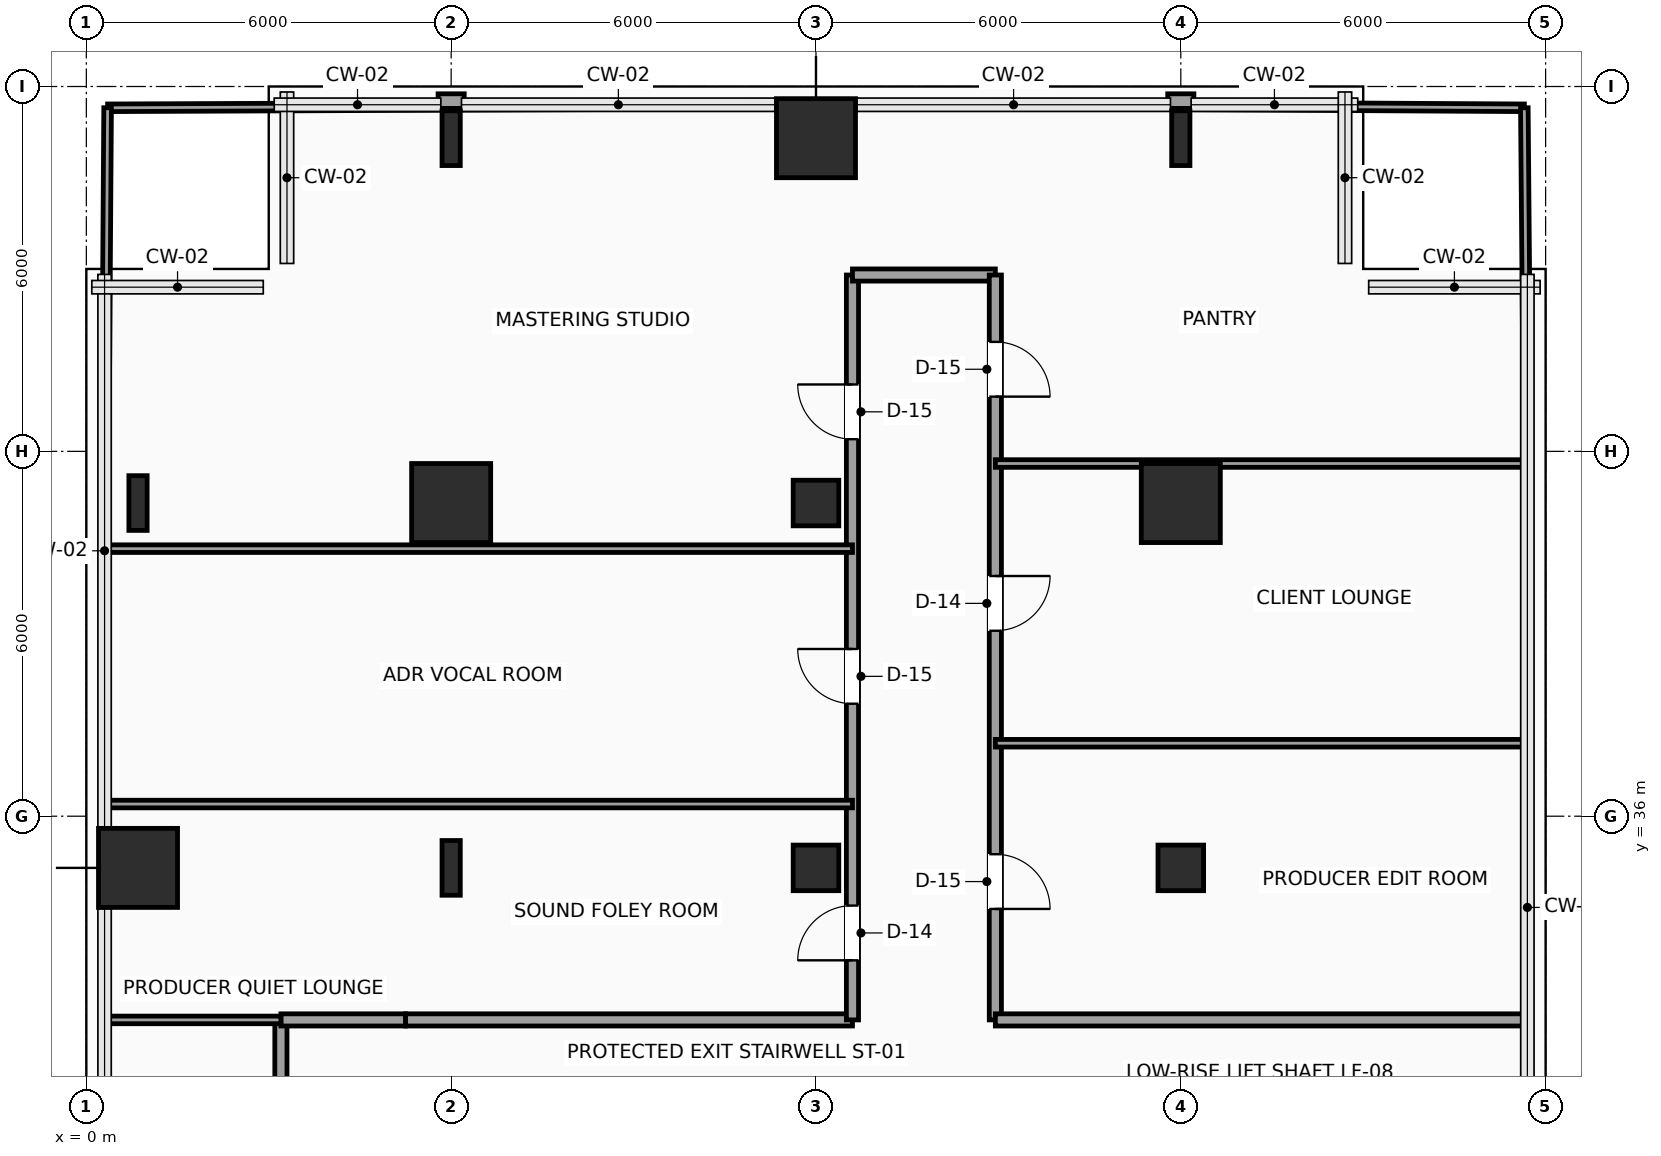
"""IFC4 building model, lengths in metres.
Left out: names, types, materials, properties, quantities, classifications, styles, units other than length and angle.
Written with IfcOpenShell. Run it as: python <this file> out.ifc"""

import sys

from ifc_helpers import new_model, si_unit, direction, frame, frame_2d, origin, origin_2d, place, context, subcontext, project, spatial, rectangle, hollow_rectangle, i_section, extrude, element, fill, save


model = new_model("IFC4")
c1 = context("Model", 3, precision=1e-05, world=origin(), true_north=direction((0.0, 1.0)))
c2 = subcontext(c1, "Body", "Model", "MODEL_VIEW")
j1 = project(units=[si_unit("LENGTHUNIT", "METRE"), si_unit("PLANEANGLEUNIT", "RADIAN")], contexts=[c1])
p1 = place(None, origin())
s1 = spatial("IfcSite", under=j1, at=p1, CompositionType="ELEMENT")
p2 = place(p1, origin())
s2 = spatial("IfcBuilding", under=s1, at=p2, CompositionType="ELEMENT")
p3 = place(p2, frame((0.0, 0.0, 51.9)))
s3 = spatial("IfcBuildingStorey", under=s2, at=p3, CompositionType="ELEMENT", Elevation=51.9)
p4 = place(p3, frame((0.85, 35.15, 0.0), z_axis=(0.0, 0.0, 1.0), x_axis=(1.0, 0.0, 0.0)))
e1 = element("IfcColumn", 1, at=p4, inside=s3, PredefinedType="COLUMN", context=c2, shape_type="SweptSolid", body=[
    extrude(rectangle(XDim=1.3, YDim=1.3, at=origin_2d()), origin(), (0.0, 0.0, 1.0), 3.9),
])
for number, where, z_axis, x_axis in (
    (2, (0.85, 41.15, 0.0), (0.0, 0.0, 1.0), (1.0, 0.0, 0.0)),
    (3, (6.0, 35.15, 0.0), (0.0, 0.0, 1.0), (1.0, 0.0, 0.0)),
):
    element("IfcColumn", number, at=place(p3, frame(where, z_axis=z_axis, x_axis=x_axis)), inside=s3, PredefinedType="COLUMN", context=c2, shape_type="SweptSolid", body=[
        extrude(i_section(OverallWidth=0.3, OverallDepth=0.9, WebThickness=0.019, FlangeThickness=0.035, FilletRadius=0.03, at=origin_2d()), origin(), (0.0, 0.0, 1.0), 3.9),
    ])
p5 = place(p3, frame((6.0, 41.15, 0.0), z_axis=(0.0, 0.0, 1.0), x_axis=(1.0, 0.0, 0.0)))
e4 = element("IfcColumn", 4, at=p5, inside=s3, PredefinedType="COLUMN", context=c2, shape_type="SweptSolid", body=[
    extrude(rectangle(XDim=1.3, YDim=1.3, at=origin_2d()), origin(), (0.0, 0.0, 1.0), 3.9),
])
p6 = place(p3, frame((6.0, 47.15, 0.0), z_axis=(0.0, 0.0, 1.0), x_axis=(1.0, 0.0, 0.0)))
e5 = element("IfcColumn", 5, at=p6, inside=s3, PredefinedType="COLUMN", context=c2, shape_type="SweptSolid", body=[
    extrude(i_section(OverallWidth=0.3, OverallDepth=0.9, WebThickness=0.019, FlangeThickness=0.035, FilletRadius=0.03, at=origin_2d()), origin(), (0.0, 0.0, 1.0), 3.9),
])
for number, where, z_axis, x_axis in (
    (6, (12.0, 35.15, 0.0), (0.0, 0.0, 1.0), (1.0, 0.0, 0.0)),
    (7, (12.0, 41.15, 0.0), (0.0, 0.0, 1.0), (1.0, 0.0, 0.0)),
):
    element("IfcColumn", number, at=place(p3, frame(where, z_axis=z_axis, x_axis=x_axis)), inside=s3, PredefinedType="COLUMN", context=c2, shape_type="SweptSolid", body=[
        extrude(hollow_rectangle(XDim=0.75, YDim=0.75, WallThickness=0.035, InnerFilletRadius=0.035, OuterFilletRadius=0.05, at=origin_2d()), origin(), (0.0, 0.0, 1.0), 3.9),
    ])
p7 = place(p3, frame((12.0, 47.15, 0.0), z_axis=(0.0, 0.0, 1.0), x_axis=(1.0, 0.0, 0.0)))
e8 = element("IfcColumn", 8, at=p7, inside=s3, PredefinedType="COLUMN", context=c2, shape_type="SweptSolid", body=[
    extrude(rectangle(XDim=1.3, YDim=1.3, at=origin_2d()), origin(), (0.0, 0.0, 1.0), 3.9),
])
p8 = place(p3, frame((18.0, 35.15, 0.0), z_axis=(0.0, 0.0, 1.0), x_axis=(1.0, 0.0, 0.0)))
e9 = element("IfcColumn", 9, at=p8, inside=s3, PredefinedType="COLUMN", context=c2, shape_type="SweptSolid", body=[
    extrude(hollow_rectangle(XDim=0.75, YDim=0.75, WallThickness=0.035, InnerFilletRadius=0.035, OuterFilletRadius=0.05, at=origin_2d()), origin(), (0.0, 0.0, 1.0), 3.9),
])
p9 = place(p3, frame((18.0, 41.15, 0.0), z_axis=(0.0, 0.0, 1.0), x_axis=(1.0, 0.0, 0.0)))
e10 = element("IfcColumn", 10, at=p9, inside=s3, PredefinedType="COLUMN", context=c2, shape_type="SweptSolid", body=[
    extrude(rectangle(XDim=1.3, YDim=1.3, at=origin_2d()), origin(), (0.0, 0.0, 1.0), 3.9),
])
p10 = place(p3, frame((18.0, 47.15, 0.0), z_axis=(0.0, 0.0, 1.0), x_axis=(1.0, 0.0, 0.0)))
e11 = element("IfcColumn", 11, at=p10, inside=s3, PredefinedType="COLUMN", context=c2, shape_type="SweptSolid", body=[
    extrude(i_section(OverallWidth=0.3, OverallDepth=0.9, WebThickness=0.019, FlangeThickness=0.035, FilletRadius=0.03, at=origin_2d()), origin(), (0.0, 0.0, 1.0), 3.9),
])
for number, where, z_axis, x_axis in (
    (12, (5.785, 47.76, 0.0), (0.0, 0.0, 1.0), (1.0, 0.0, 0.0)),
    (13, (17.785, 47.76, 0.0), (0.0, 0.0, 1.0), (1.0, 0.0, 0.0)),
):
    element("IfcWall", number, at=place(p3, frame(where, z_axis=z_axis, x_axis=x_axis)), inside=s3, PredefinedType="SOLIDWALL", context=c2, shape_type="SweptSolid", body=[
        extrude(rectangle(XDim=0.43, YDim=0.24, at=frame_2d((0.215, 0.0))), origin(), (0.0, 0.0, 1.0), 3.65),
    ])
p11 = place(p3, frame((3.2, 30.25, 0.0), z_axis=(0.0, 0.0, 1.0), x_axis=(0.0, 1.0, 0.0)))
e14 = element("IfcWall", 14, at=p11, inside=s3, PredefinedType="PARTITIONING", context=c2, shape_type="SweptSolid", body=[
    extrude(rectangle(XDim=2.4, YDim=0.2, at=frame_2d((1.2, 0.0))), origin(), (0.0, 0.0, 1.0), 3.65),
])
p12 = place(p3, frame((3.2, 32.65, 0.0), z_axis=(0.0, 0.0, 1.0), x_axis=(1.0, 0.0, 0.0)))
e15 = element("IfcWall", 15, at=p12, inside=s3, PredefinedType="PARTITIONING", context=c2, shape_type="SweptSolid", body=[
    extrude(rectangle(XDim=2.05, YDim=0.2, at=frame_2d((1.025, 0.0))), origin(), (0.0, 0.0, 1.0), 3.65),
])
p13 = place(p3, frame((5.25, 32.65, 0.0), z_axis=(0.0, 0.0, 1.0), x_axis=(1.0, 0.0, 0.0)))
e16 = element("IfcWall", 16, at=p13, inside=s3, PredefinedType="PARTITIONING", context=c2, shape_type="SweptSolid", body=[
    extrude(rectangle(XDim=7.35, YDim=0.2, at=frame_2d((3.675, 0.0))), origin(), (0.0, 0.0, 1.0), 3.65),
])
p14 = place(p3, frame((12.6, 32.65, 0.0), z_axis=(0.0, 0.0, 1.0), x_axis=(0.0, 1.0, 0.0)))
e17 = element("IfcWall", 17, at=p14, inside=s3, PredefinedType="PARTITIONING", context=c2, shape_type="SweptSolid", body=[
    extrude(rectangle(XDim=12.25, YDim=0.2, at=frame_2d((6.125, 0.0))), origin(), (0.0, 0.0, 1.0), 3.65),
])
p15 = place(p14, frame((0.98, 0.0, 0.0)))
e18 = element("IfcOpeningElement", 18, at=p15, cuts=e17, PredefinedType="OPENING", context=c2, shape_type="SweptSolid", body=[
    extrude(rectangle(XDim=0.9, YDim=2.1, at=frame_2d((0.45, 1.05))), frame((0.0, 0.11, 0.0), z_axis=(0.0, -1.0, 0.0), x_axis=(1.0, 0.0, 0.0)), (0.0, 0.0, 1.0), 0.22),
])
p16 = place(p14, frame((5.2, 0.0, 0.0)))
e19 = element("IfcOpeningElement", 19, at=p16, cuts=e17, PredefinedType="OPENING", context=c2, shape_type="SweptSolid", body=[
    extrude(rectangle(XDim=0.9, YDim=2.1, at=frame_2d((0.45, 1.05))), frame((0.0, 0.11, 0.0), z_axis=(0.0, -1.0, 0.0), x_axis=(1.0, 0.0, 0.0)), (0.0, 0.0, 1.0), 0.22),
])
p17 = place(p14, frame((9.55, 0.0, 0.0)))
e20 = element("IfcOpeningElement", 20, at=p17, cuts=e17, PredefinedType="OPENING", context=c2, shape_type="SweptSolid", body=[
    extrude(rectangle(XDim=0.9, YDim=2.1, at=frame_2d((0.45, 1.05))), frame((0.0, 0.11, 0.0), z_axis=(0.0, -1.0, 0.0), x_axis=(1.0, 0.0, 0.0)), (0.0, 0.0, 1.0), 0.22),
])
p18 = place(p3, frame((12.6, 44.9, 0.0), z_axis=(0.0, 0.0, 1.0), x_axis=(1.0, 0.0, 0.0)))
e21 = element("IfcWall", 21, at=p18, inside=s3, PredefinedType="PARTITIONING", context=c2, shape_type="SweptSolid", body=[
    extrude(rectangle(XDim=2.35, YDim=0.2, at=frame_2d((1.175, 0.0))), origin(), (0.0, 0.0, 1.0), 3.65),
])
p19 = place(p3, frame((14.95, 44.9, 0.0), z_axis=(0.0, 0.0, 1.0), x_axis=(0.0, -1.0, 0.0)))
e22 = element("IfcWall", 22, at=p19, inside=s3, PredefinedType="PARTITIONING", context=c2, shape_type="SweptSolid", body=[
    extrude(rectangle(XDim=12.25, YDim=0.2, at=frame_2d((6.125, 0.0))), origin(), (0.0, 0.0, 1.0), 3.65),
])
p20 = place(p19, frame((9.525, 0.0, 0.0)))
e23 = element("IfcOpeningElement", 23, at=p20, cuts=e22, PredefinedType="OPENING", context=c2, shape_type="SweptSolid", body=[
    extrude(rectangle(XDim=0.9, YDim=2.1, at=frame_2d((0.45, 1.05))), frame((0.0, 0.11, 0.0), z_axis=(0.0, -1.0, 0.0), x_axis=(1.0, 0.0, 0.0)), (0.0, 0.0, 1.0), 0.22),
])
p21 = place(p19, frame((4.95, 0.0, 0.0)))
e24 = element("IfcOpeningElement", 24, at=p21, cuts=e22, PredefinedType="OPENING", context=c2, shape_type="SweptSolid", body=[
    extrude(rectangle(XDim=0.9, YDim=2.1, at=frame_2d((0.45, 1.05))), frame((0.0, 0.11, 0.0), z_axis=(0.0, -1.0, 0.0), x_axis=(1.0, 0.0, 0.0)), (0.0, 0.0, 1.0), 0.22),
])
p22 = place(p19, frame((1.1, 0.0, 0.0)))
e25 = element("IfcOpeningElement", 25, at=p22, cuts=e22, PredefinedType="OPENING", context=c2, shape_type="SweptSolid", body=[
    extrude(rectangle(XDim=0.9, YDim=2.1, at=frame_2d((0.45, 1.05))), frame((0.0, 0.11, 0.0), z_axis=(0.0, -1.0, 0.0), x_axis=(1.0, 0.0, 0.0)), (0.0, 0.0, 1.0), 0.22),
])
p23 = place(p3, frame((14.95, 32.65, 0.0), z_axis=(0.0, 0.0, 1.0), x_axis=(1.0, 0.0, 0.0)))
e26 = element("IfcWall", 26, at=p23, inside=s3, PredefinedType="PARTITIONING", context=c2, shape_type="SweptSolid", body=[
    extrude(rectangle(XDim=8.75, YDim=0.2, at=frame_2d((4.375, 0.0))), origin(), (0.0, 0.0, 1.0), 3.65),
])
for number, where, z_axis, x_axis in (
    (27, (0.3, 36.2, 0.0), (0.0, 0.0, 1.0), (1.0, 0.0, 0.0)),
    (28, (0.3, 40.4, 0.0), (0.0, 0.0, 1.0), (1.0, 0.0, 0.0)),
):
    element("IfcWall", number, at=place(p3, frame(where, z_axis=z_axis, x_axis=x_axis)), inside=s3, PredefinedType="PARTITIONING", context=c2, shape_type="SweptSolid", body=[
        extrude(rectangle(XDim=12.3, YDim=0.125, at=frame_2d((6.15, 0.0))), origin(), (0.0, 0.0, 1.0), 3.65),
    ])
p24 = place(p3, frame((0.35, 47.65, 0.0), z_axis=(0.0, 0.0, 1.0), x_axis=(0.999991644778, 0.004087832518, 0.0)))
e29 = element("IfcWall", 29, at=p24, inside=s3, PredefinedType="PARTITIONING", context=c2, shape_type="SweptSolid", body=[
    extrude(rectangle(XDim=5.435, YDim=0.125, at=frame_2d((2.717, 0.0))), origin(), (0.0, 0.0, 1.0), 3.65),
])
p25 = place(p3, frame((6.215, 47.674, 0.0), z_axis=(0.0, 0.0, 1.0), x_axis=(0.999991630701, 0.004091274595, 0.0)))
e30 = element("IfcWall", 30, at=p25, inside=s3, PredefinedType="PARTITIONING", context=c2, shape_type="SweptSolid", body=[
    extrude(rectangle(XDim=6.385, YDim=0.125, at=frame_2d((3.192, 0.0))), origin(), (0.0, 0.0, 1.0), 3.65),
])
p26 = place(p3, frame((0.3, 40.4, 0.0), z_axis=(0.0, 0.0, 1.0), x_axis=(0.006903122154, 0.999976173168, 0.0)))
e31 = element("IfcWall", 31, at=p26, inside=s3, PredefinedType="PARTITIONING", context=c2, shape_type="SweptSolid", body=[
    extrude(rectangle(XDim=7.25, YDim=0.125, at=frame_2d((3.625, 0.0))), origin(), (0.0, 0.0, 1.0), 3.65),
])
for number, where, z_axis, x_axis in (
    (32, (14.95, 37.2, 0.0), (0.0, 0.0, 1.0), (1.0, 0.0, 0.0)),
    (33, (14.95, 41.8, 0.0), (0.0, 0.0, 1.0), (1.0, 0.0, 0.0)),
):
    element("IfcWall", number, at=place(p3, frame(where, z_axis=z_axis, x_axis=x_axis)), inside=s3, PredefinedType="PARTITIONING", context=c2, shape_type="SweptSolid", body=[
        extrude(rectangle(XDim=8.75, YDim=0.125, at=frame_2d((4.375, 0.0))), origin(), (0.0, 0.0, 1.0), 3.65),
    ])
p27 = place(p3, frame((14.95, 47.7, 0.0), z_axis=(0.0, 0.0, 1.0), x_axis=(0.999983354582, -0.005769797172, 0.0)))
e34 = element("IfcWall", 34, at=p27, inside=s3, PredefinedType="PARTITIONING", context=c2, shape_type="SweptSolid", body=[
    extrude(rectangle(XDim=2.835, YDim=0.125, at=frame_2d((1.417, 0.0))), origin(), (0.0, 0.0, 1.0), 3.65),
])
p28 = place(p3, frame((18.215, 47.681, 0.0), z_axis=(0.0, 0.0, 1.0), x_axis=(0.999983469354, -0.005749871258, 0.0)))
e35 = element("IfcWall", 35, at=p28, inside=s3, PredefinedType="PARTITIONING", context=c2, shape_type="SweptSolid", body=[
    extrude(rectangle(XDim=5.435, YDim=0.125, at=frame_2d((2.717, 0.0))), origin(), (0.0, 0.0, 1.0), 3.65),
])
p29 = place(p3, frame((23.7, 41.8, 0.0), z_axis=(0.0, 0.0, 1.0), x_axis=(-0.00855525636, 0.999963403125, 0.0)))
e36 = element("IfcWall", 36, at=p29, inside=s3, PredefinedType="PARTITIONING", context=c2, shape_type="SweptSolid", body=[
    extrude(rectangle(XDim=5.85, YDim=0.125, at=frame_2d((2.925, 0.0))), origin(), (0.0, 0.0, 1.0), 3.65),
])
p30 = place(p3, frame((0.3, 32.65, 0.0), z_axis=(0.0, 0.0, 1.0), x_axis=(1.0, 0.0, 0.0)))
e37 = element("IfcWall", 37, at=p30, inside=s3, PredefinedType="PARTITIONING", context=c2, shape_type="SweptSolid", body=[
    extrude(rectangle(XDim=2.9, YDim=0.125, at=frame_2d((1.45, 0.0))), origin(), (0.0, 0.0, 1.0), 3.65),
])
p31 = place(p15, origin())
e38 = element("IfcDoor", 38, at=p31, inside=s3, OperationType="SINGLE_SWING_LEFT", PredefinedType="DOOR", context=c2, shape_type="SweptSolid", body=[
    extrude(rectangle(XDim=0.9, YDim=2.1, at=frame_2d((0.45, 1.05))), frame((0.0, 0.025, 0.0), z_axis=(0.0, -1.0, 0.0), x_axis=(1.0, 0.0, 0.0)), (0.0, 0.0, 1.0), 0.05),
])
fill(e18, e38)
p32 = place(p16, origin())
e39 = element("IfcDoor", 39, at=p32, inside=s3, OperationType="SINGLE_SWING_RIGHT", PredefinedType="DOOR", context=c2, shape_type="SweptSolid", body=[
    extrude(rectangle(XDim=0.9, YDim=2.1, at=frame_2d((0.45, 1.05))), frame((0.0, 0.025, 0.0), z_axis=(0.0, -1.0, 0.0), x_axis=(1.0, 0.0, 0.0)), (0.0, 0.0, 1.0), 0.05),
])
fill(e19, e39)
p33 = place(p17, origin())
e40 = element("IfcDoor", 40, at=p33, inside=s3, OperationType="SINGLE_SWING_RIGHT", PredefinedType="DOOR", context=c2, shape_type="SweptSolid", body=[
    extrude(rectangle(XDim=0.9, YDim=2.1, at=frame_2d((0.45, 1.05))), frame((0.0, 0.025, 0.0), z_axis=(0.0, -1.0, 0.0), x_axis=(1.0, 0.0, 0.0)), (0.0, 0.0, 1.0), 0.05),
])
fill(e20, e40)
p34 = place(p20, origin())
e41 = element("IfcDoor", 41, at=p34, inside=s3, OperationType="SINGLE_SWING_RIGHT", PredefinedType="DOOR", context=c2, shape_type="SweptSolid", body=[
    extrude(rectangle(XDim=0.9, YDim=2.1, at=frame_2d((0.45, 1.05))), frame((0.0, 0.025, 0.0), z_axis=(0.0, -1.0, 0.0), x_axis=(1.0, 0.0, 0.0)), (0.0, 0.0, 1.0), 0.05),
])
fill(e23, e41)
p35 = place(p21, origin())
e42 = element("IfcDoor", 42, at=p35, inside=s3, OperationType="SINGLE_SWING_LEFT", PredefinedType="DOOR", context=c2, shape_type="SweptSolid", body=[
    extrude(rectangle(XDim=0.9, YDim=2.1, at=frame_2d((0.45, 1.05))), frame((0.0, 0.025, 0.0), z_axis=(0.0, -1.0, 0.0), x_axis=(1.0, 0.0, 0.0)), (0.0, 0.0, 1.0), 0.05),
])
fill(e24, e42)
p36 = place(p22, origin())
e43 = element("IfcDoor", 43, at=p36, inside=s3, OperationType="SINGLE_SWING_RIGHT", PredefinedType="DOOR", context=c2, shape_type="SweptSolid", body=[
    extrude(rectangle(XDim=0.9, YDim=2.1, at=frame_2d((0.45, 1.05))), frame((0.0, 0.025, 0.0), z_axis=(0.0, -1.0, 0.0), x_axis=(1.0, 0.0, 0.0)), (0.0, 0.0, 1.0), 0.05),
])
fill(e25, e43)
save(model, sys.argv[1])
